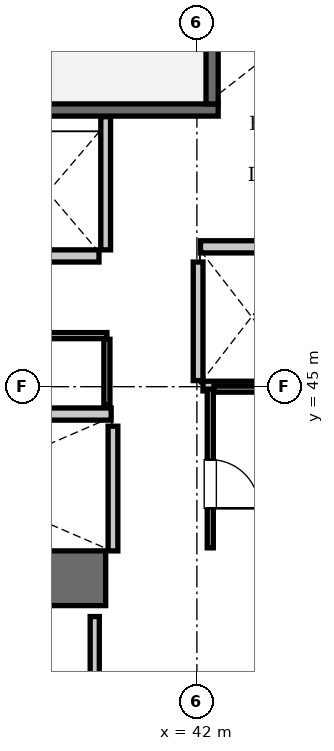
"""IFC4 building model, lengths in metres.
Left out: names, types, materials, properties, quantities, classifications, styles, units other than length and angle.
Written with IfcOpenShell. Run it as: python <this file> out.ifc"""

import sys

from ifc_helpers import new_model, si_unit, direction, frame, frame_2d, origin, place, context, subcontext, project, spatial, rectangle, extrude, element, fill, save


model = new_model("IFC4")
c1 = context("Model", 3, precision=1e-05, world=origin(), true_north=direction((0.0, 1.0)))
c2 = subcontext(c1, "Body", "Model", "MODEL_VIEW")
j1 = project(units=[si_unit("LENGTHUNIT", "METRE"), si_unit("PLANEANGLEUNIT", "RADIAN")], contexts=[c1])
p1 = place(None, origin())
s1 = spatial("IfcSite", under=j1, at=p1, CompositionType="ELEMENT")
p2 = place(p1, origin())
s2 = spatial("IfcBuilding", under=s1, at=p2, CompositionType="ELEMENT")
p3 = place(p2, frame((0.0, 0.0, 96.25)))
s3 = spatial("IfcBuildingStorey", under=s2, at=p3, CompositionType="ELEMENT", Elevation=96.25)
p4 = place(p3, frame((35.1, 41.85, 0.0), z_axis=(0.0, 0.0, 1.0), x_axis=(1.0, 0.0, 0.0)))
e1 = element("IfcWall", 1, at=p4, inside=s3, PredefinedType="SHEAR", context=c2, shape_type="SweptSolid", body=[
    extrude(rectangle(XDim=5.4, YDim=0.9, at=frame_2d((2.7, 0.0))), origin(), (0.0, 0.0, 1.0), 3.85),
])
p5 = place(p3, frame((33.25, 49.55, 0.0), z_axis=(0.0, 0.0, 1.0), x_axis=(1.0, 0.0, 0.0)))
e2 = element("IfcWall", 2, at=p5, inside=s3, PredefinedType="SOLIDWALL", context=c2, shape_type="SweptSolid", body=[
    extrude(rectangle(XDim=9.1, YDim=0.2, at=frame_2d((4.55, 0.0))), origin(), (0.0, 0.0, 1.0), 3.61),
])
p6 = place(p3, frame((42.25, 49.65, 0.0), z_axis=(0.0, 0.0, 1.0), x_axis=(0.0, 1.0, 0.0)))
e3 = element("IfcWall", 3, at=p6, inside=s3, PredefinedType="SOLIDWALL", context=c2, shape_type="SweptSolid", body=[
    extrude(rectangle(XDim=3.45, YDim=0.2, at=frame_2d((1.725, 0.0))), origin(), (0.0, 0.0, 1.0), 3.61),
])
p7 = place(p3, frame((42.06, 47.3, 0.0), z_axis=(0.0, 0.0, 1.0), x_axis=(1.0, 0.0, 0.0)))
e4 = element("IfcWall", 4, at=p7, inside=s3, PredefinedType="SOLIDWALL", context=c2, shape_type="SweptSolid", body=[
    extrude(rectangle(XDim=1.68, YDim=0.2, at=frame_2d((0.84, 0.0))), origin(), (0.0, 0.0, 1.0), 3.61),
])
p8 = place(p3, frame((38.91, 44.55, 0.0), z_axis=(0.0, 0.0, 1.0), x_axis=(1.0, 0.0, 0.0)))
e5 = element("IfcWall", 5, at=p8, inside=s3, PredefinedType="SOLIDWALL", context=c2, shape_type="SweptSolid", body=[
    extrude(rectangle(XDim=1.68, YDim=0.2, at=frame_2d((0.84, 0.0))), origin(), (0.0, 0.0, 1.0), 3.61),
])
p9 = place(p3, frame((38.71, 47.15, 0.0), z_axis=(0.0, 0.0, 1.0), x_axis=(1.0, 0.0, 0.0)))
e6 = element("IfcWall", 6, at=p9, inside=s3, PredefinedType="SOLIDWALL", context=c2, shape_type="SweptSolid", body=[
    extrude(rectangle(XDim=1.68, YDim=0.2, at=frame_2d((0.84, 0.0))), origin(), (0.0, 0.0, 1.0), 3.61),
])
p10 = place(p3, frame((42.02, 45.1, 0.0), z_axis=(0.0, 0.0, 1.0), x_axis=(0.0, 1.0, 0.0)))
e7 = element("IfcWall", 7, at=p10, inside=s3, PredefinedType="SOLIDWALL", context=c2, shape_type="SweptSolid", body=[
    extrude(rectangle(XDim=1.95, YDim=0.16, at=frame_2d((0.975, 0.0))), origin(), (0.0, 0.0, 1.0), 3.61),
])
p11 = place(p3, frame((42.1, 45.01, 0.0), z_axis=(0.0, 0.0, 1.0), x_axis=(1.0, 0.0, 0.0)))
e8 = element("IfcWall", 8, at=p11, inside=s3, PredefinedType="SOLIDWALL", context=c2, shape_type="SweptSolid", body=[
    extrude(rectangle(XDim=3.45, YDim=0.16, at=frame_2d((1.725, 0.0))), origin(), (0.0, 0.0, 1.0), 3.61),
])
p12 = place(p3, frame((40.62, 42.3, 0.0), z_axis=(0.0, 0.0, 1.0), x_axis=(0.0, 1.0, 0.0)))
e9 = element("IfcWall", 9, at=p12, inside=s3, PredefinedType="SOLIDWALL", context=c2, shape_type="SweptSolid", body=[
    extrude(rectangle(XDim=2.05, YDim=0.16, at=frame_2d((1.025, 0.0))), origin(), (0.0, 0.0, 1.0), 3.61),
])
p13 = place(p3, frame((40.5, 47.25, 0.0), z_axis=(0.0, 0.0, 1.0), x_axis=(0.0, 1.0, 0.0)))
e10 = element("IfcWall", 10, at=p13, inside=s3, PredefinedType="SOLIDWALL", context=c2, shape_type="SweptSolid", body=[
    extrude(rectangle(XDim=2.19, YDim=0.16, at=frame_2d((1.095, 0.0))), origin(), (0.0, 0.0, 1.0), 3.61),
])
p14 = place(p3, frame((38.02, 45.84, 0.0), z_axis=(0.0, 0.0, 1.0), x_axis=(1.0, 0.0, 0.0)))
e11 = element("IfcWall", 11, at=p14, inside=s3, PredefinedType="PARTITIONING", context=c2, shape_type="SweptSolid", body=[
    extrude(rectangle(XDim=2.5, YDim=0.1, at=frame_2d((1.25, 0.0))), origin(), (0.0, 0.0, 1.0), 3.61),
])
p15 = place(p14, frame((0.75, 0.0, 0.0)))
e12 = element("IfcOpeningElement", 12, at=p15, cuts=e11, PredefinedType="OPENING", context=c2, shape_type="SweptSolid", body=[
    extrude(rectangle(XDim=0.8, YDim=2.05, at=frame_2d((0.4, 1.025))), frame((0.0, 0.06, 0.0), z_axis=(0.0, -1.0, 0.0), x_axis=(1.0, 0.0, 0.0)), (0.0, 0.0, 1.0), 0.12),
])
p16 = place(p3, frame((40.52, 44.7, 0.0), z_axis=(0.0, 0.0, 1.0), x_axis=(0.0, 1.0, 0.0)))
e13 = element("IfcWall", 13, at=p16, inside=s3, PredefinedType="PARTITIONING", context=c2, shape_type="SweptSolid", body=[
    extrude(rectangle(XDim=1.08, YDim=0.1, at=frame_2d((0.54, 0.0))), origin(), (0.0, 0.0, 1.0), 3.61),
])
p17 = place(p3, frame((42.22, 42.35, 0.0), z_axis=(0.0, 0.0, 1.0), x_axis=(0.0, 1.0, 0.0)))
e14 = element("IfcWall", 14, at=p17, inside=s3, PredefinedType="PARTITIONING", context=c2, shape_type="SweptSolid", body=[
    extrude(rectangle(XDim=2.61, YDim=0.1, at=frame_2d((1.305, 0.0))), origin(), (0.0, 0.0, 1.0), 3.61),
])
p18 = place(p17, frame((0.65, 0.0, 0.0)))
e15 = element("IfcOpeningElement", 15, at=p18, cuts=e14, PredefinedType="OPENING", context=c2, shape_type="SweptSolid", body=[
    extrude(rectangle(XDim=0.8, YDim=2.05, at=frame_2d((0.4, 1.025))), frame((0.0, 0.06, 0.0), z_axis=(0.0, -1.0, 0.0), x_axis=(1.0, 0.0, 0.0)), (0.0, 0.0, 1.0), 0.12),
])
p19 = place(p3, frame((42.28, 44.96, 0.0), z_axis=(0.0, 0.0, 1.0), x_axis=(1.0, 0.0, 0.0)))
e16 = element("IfcWall", 16, at=p19, inside=s3, PredefinedType="PARTITIONING", context=c2, shape_type="SweptSolid", body=[
    extrude(rectangle(XDim=1.3, YDim=0.1, at=frame_2d((0.65, 0.0))), origin(), (0.0, 0.0, 1.0), 3.61),
])
p20 = place(p3, frame((40.32, 38.38, 0.0), z_axis=(0.0, 0.0, 1.0), x_axis=(0.0, 1.0, 0.0)))
e17 = element("IfcWall", 17, at=p20, inside=s3, PredefinedType="PARTITIONING", context=c2, shape_type="SweptSolid", body=[
    extrude(rectangle(XDim=2.84, YDim=0.15, at=frame_2d((1.42, 0.0))), origin(), (0.0, 0.0, 1.0), 3.61),
])
p21 = place(p18, frame((0.8, 0.0, 0.0), z_axis=(0.0, 0.0, 1.0), x_axis=(-1.0, 0.0, 0.0)))
e18 = element("IfcDoor", 18, at=p21, inside=s3, OperationType="SINGLE_SWING_RIGHT", PredefinedType="DOOR", context=c2, shape_type="SweptSolid", body=[
    extrude(rectangle(XDim=0.8, YDim=2.05, at=frame_2d((0.4, 1.025))), frame((0.0, 0.025, 0.0), z_axis=(0.0, -1.0, 0.0), x_axis=(1.0, 0.0, 0.0)), (0.0, 0.0, 1.0), 0.05),
])
fill(e15, e18)
save(model, sys.argv[1])
